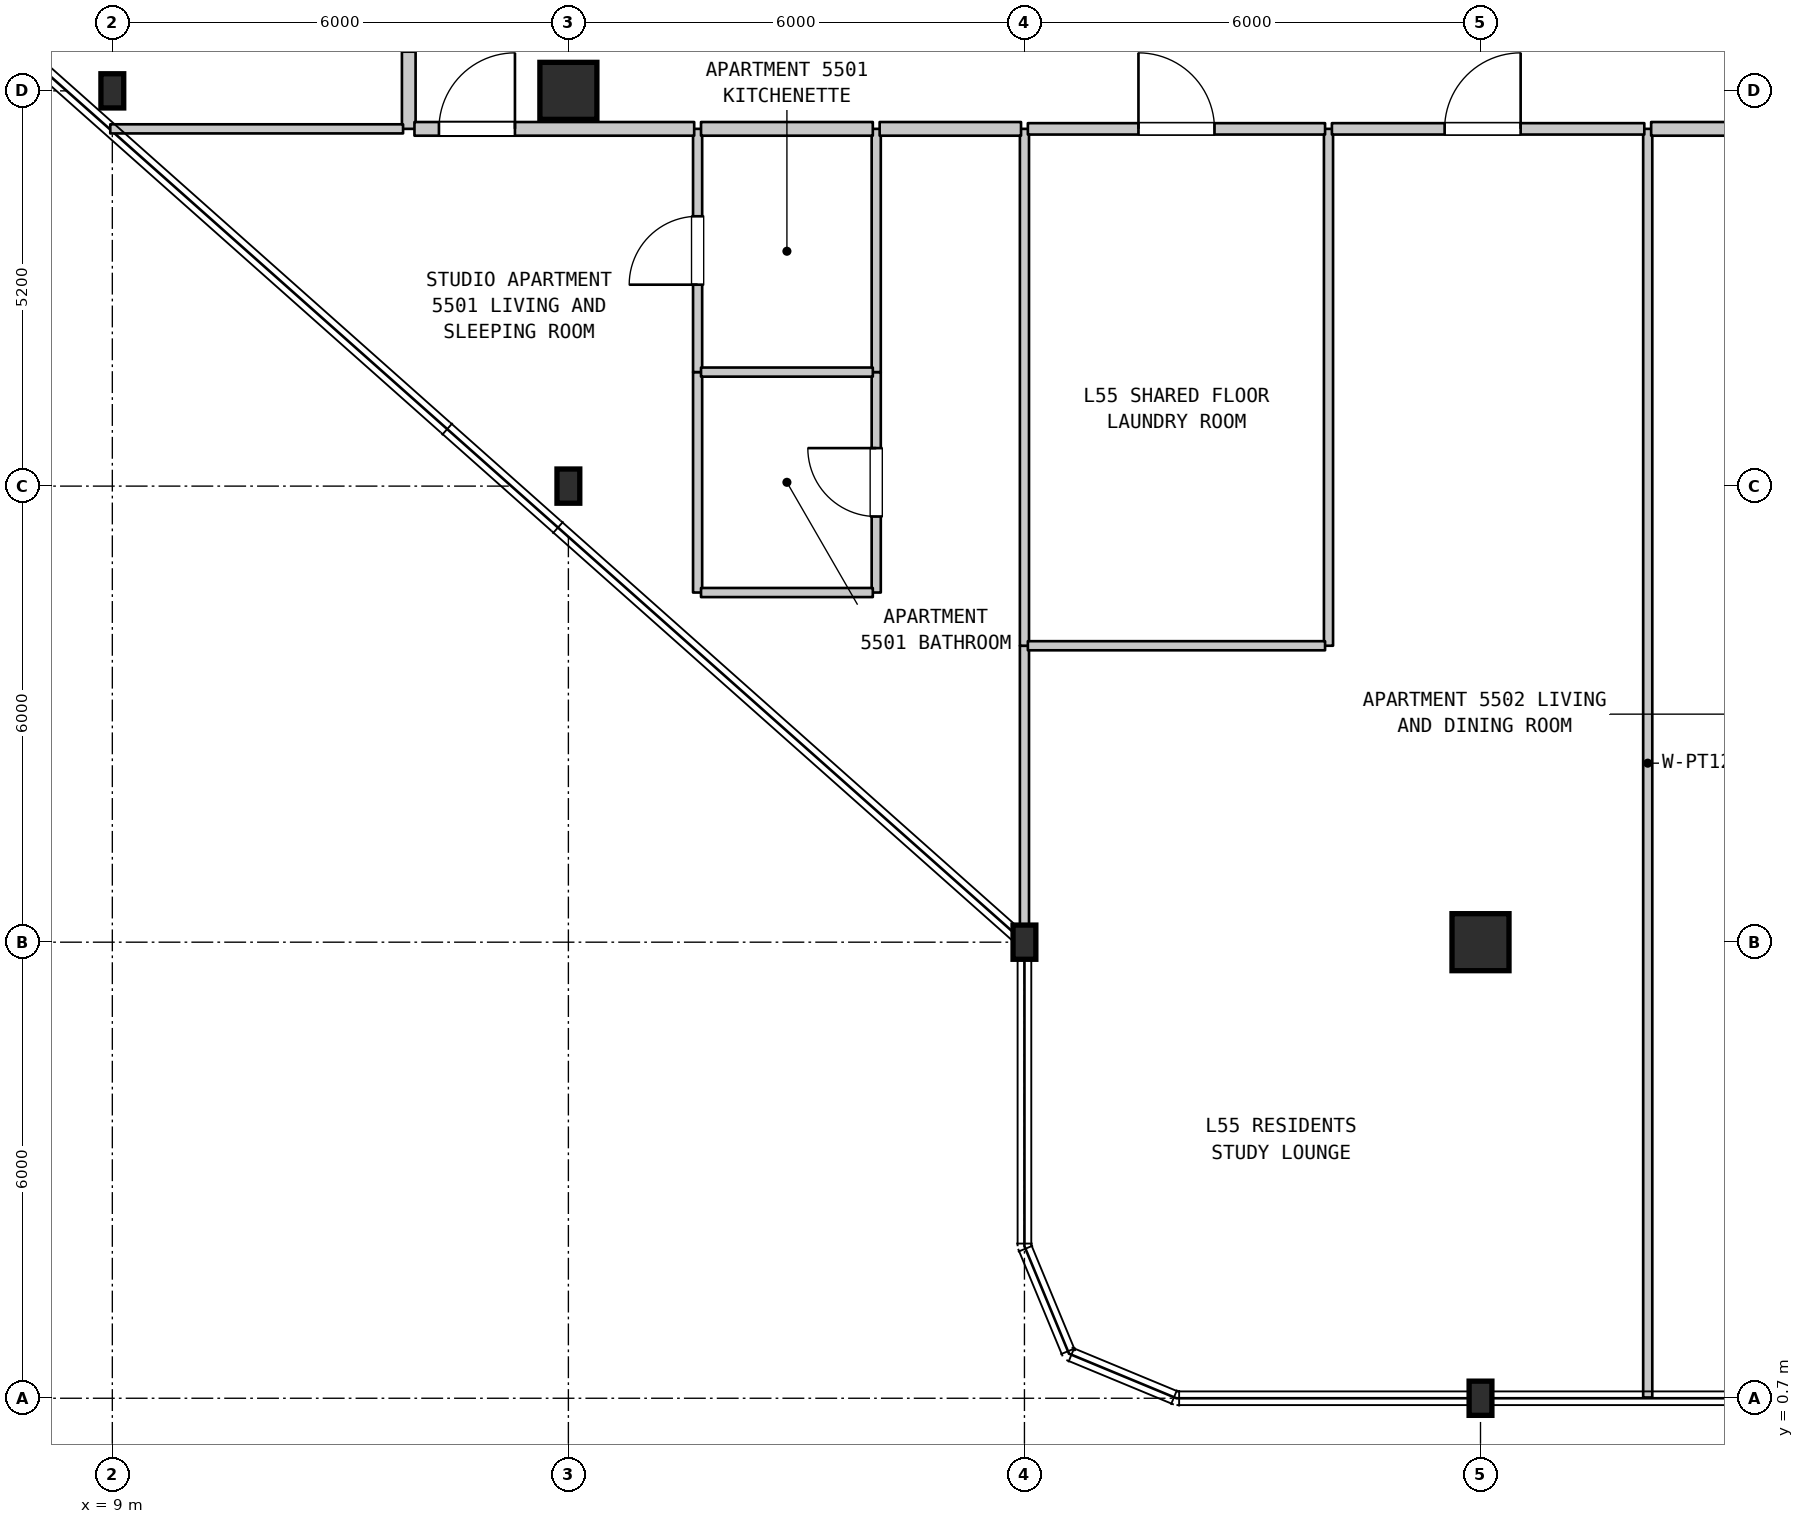
"""IFC4 building model, lengths in metres.
Left out: names, types, materials, properties, quantities, classifications, styles, units other than length and angle.
Written with IfcOpenShell. Run it as: python <this file> out.ifc"""

import sys

from ifc_helpers import new_model, si_unit, direction, frame, frame_2d, origin, origin_2d, place, context, subcontext, project, spatial, rectangle, i_section, extrude, element, fill, save


model = new_model("IFC4")
c1 = context("Model", 3, precision=1e-05, world=origin(), true_north=direction((0.0, 1.0)))
c2 = subcontext(c1, "Body", "Model", "MODEL_VIEW")
j1 = project(units=[si_unit("LENGTHUNIT", "METRE"), si_unit("PLANEANGLEUNIT", "RADIAN")], contexts=[c1])
p1 = place(None, origin())
s1 = spatial("IfcSite", under=j1, at=p1, CompositionType="ELEMENT")
p2 = place(p1, origin())
s2 = spatial("IfcBuilding", under=s1, at=p2, CompositionType="ELEMENT")
p3 = place(p2, frame((0.0, 0.0, 222.8)))
s3 = spatial("IfcBuildingStorey", under=s2, at=p3, CompositionType="ELEMENT", Elevation=222.8)
for number, where, z_axis, x_axis in (
    (1, (9.0, 17.9, 0.0), (0.0, 0.0, 1.0), (1.0, 0.0, 0.0)),
    (2, (15.0, 12.7, 0.0), (0.0, 0.0, 1.0), (1.0, 0.0, 0.0)),
):
    element("IfcColumn", number, at=place(p3, frame(where, z_axis=z_axis, x_axis=x_axis)), inside=s3, PredefinedType="COLUMN", context=c2, shape_type="SweptSolid", body=[
        extrude(i_section(OverallWidth=0.3, OverallDepth=0.45, WebThickness=0.014, FlangeThickness=0.026, FilletRadius=0.027, at=origin_2d()), origin(), (0.0, 0.0, 1.0), 3.7),
    ])
p4 = place(p3, frame((15.0, 17.9, 0.0), z_axis=(0.0, 0.0, 1.0), x_axis=(1.0, 0.0, 0.0)))
e3 = element("IfcColumn", 3, at=p4, inside=s3, PredefinedType="COLUMN", context=c2, shape_type="SweptSolid", body=[
    extrude(rectangle(XDim=0.75, YDim=0.75, at=origin_2d()), origin(), (0.0, 0.0, 1.0), 3.7),
])
for number, where, z_axis, x_axis in (
    (4, (21.0, 6.7, 0.0), (0.0, 0.0, 1.0), (1.0, 0.0, 0.0)),
    (5, (27.0, 0.7, 0.0), (0.0, 0.0, 1.0), (1.0, 0.0, 0.0)),
):
    element("IfcColumn", number, at=place(p3, frame(where, z_axis=z_axis, x_axis=x_axis)), inside=s3, PredefinedType="COLUMN", context=c2, shape_type="SweptSolid", body=[
        extrude(i_section(OverallWidth=0.3, OverallDepth=0.45, WebThickness=0.014, FlangeThickness=0.026, FilletRadius=0.027, at=origin_2d()), origin(), (0.0, 0.0, 1.0), 3.7),
    ])
p5 = place(p3, frame((27.0, 6.7, 0.0), z_axis=(0.0, 0.0, 1.0), x_axis=(1.0, 0.0, 0.0)))
e6 = element("IfcColumn", 6, at=p5, inside=s3, PredefinedType="COLUMN", context=c2, shape_type="SweptSolid", body=[
    extrude(rectangle(XDim=0.75, YDim=0.75, at=origin_2d()), origin(), (0.0, 0.0, 1.0), 3.7),
])
p6 = place(p3, frame((12.9, 17.4, 0.0), z_axis=(0.0, 0.0, 1.0), x_axis=(0.0, 1.0, 0.0)))
e7 = element("IfcWall", 7, at=p6, inside=s3, PredefinedType="STANDARD", context=c2, shape_type="SweptSolid", body=[
    extrude(rectangle(XDim=3.18, YDim=0.18, at=frame_2d((1.59, 0.0))), origin(), (0.0, 0.0, 1.0), 3.39),
])
p7 = place(p6, frame((1.015, 0.0, 0.0)))
e8 = element("IfcOpeningElement", 8, at=p7, cuts=e7, PredefinedType="OPENING", context=c2, shape_type="SweptSolid", body=[
    extrude(rectangle(XDim=1.0, YDim=2.15, at=frame_2d((0.5, 1.075))), frame((0.0, 0.1, 0.0), z_axis=(0.0, -1.0, 0.0), x_axis=(1.0, 0.0, 0.0)), (0.0, 0.0, 1.0), 0.2),
])
p8 = place(p3, frame((16.7, 11.3, 0.0), z_axis=(0.0, 0.0, 1.0), x_axis=(0.0, 1.0, 0.0)))
e9 = element("IfcWall", 9, at=p8, inside=s3, PredefinedType="PARTITIONING", context=c2, shape_type="SweptSolid", body=[
    extrude(rectangle(XDim=2.9, YDim=0.12, at=frame_2d((1.45, 0.0))), origin(), (0.0, 0.0, 1.0), 3.39),
])
p9 = place(p3, frame((16.7, 14.2, 0.0), z_axis=(0.0, 0.0, 1.0), x_axis=(0.0, 1.0, 0.0)))
e10 = element("IfcWall", 10, at=p9, inside=s3, PredefinedType="PARTITIONING", context=c2, shape_type="SweptSolid", body=[
    extrude(rectangle(XDim=3.2, YDim=0.12, at=frame_2d((1.6, 0.0))), origin(), (0.0, 0.0, 1.0), 3.39),
])
p10 = place(p9, frame((1.15, 0.0, 0.0)))
e11 = element("IfcOpeningElement", 11, at=p10, cuts=e10, PredefinedType="OPENING", context=c2, shape_type="SweptSolid", body=[
    extrude(rectangle(XDim=0.9, YDim=2.15, at=frame_2d((0.45, 1.075))), frame((0.0, 0.07, 0.0), z_axis=(0.0, -1.0, 0.0), x_axis=(1.0, 0.0, 0.0)), (0.0, 0.0, 1.0), 0.14),
])
p11 = place(p3, frame((19.05, 11.3, 0.0), z_axis=(0.0, 0.0, 1.0), x_axis=(0.0, 1.0, 0.0)))
e12 = element("IfcWall", 12, at=p11, inside=s3, PredefinedType="PARTITIONING", context=c2, shape_type="SweptSolid", body=[
    extrude(rectangle(XDim=2.9, YDim=0.12, at=frame_2d((1.45, 0.0))), origin(), (0.0, 0.0, 1.0), 3.39),
])
p12 = place(p11, frame((1.0, 0.0, 0.0)))
e13 = element("IfcOpeningElement", 13, at=p12, cuts=e12, PredefinedType="OPENING", context=c2, shape_type="SweptSolid", body=[
    extrude(rectangle(XDim=0.9, YDim=2.1, at=frame_2d((0.45, 1.05))), frame((0.0, 0.07, 0.0), z_axis=(0.0, -1.0, 0.0), x_axis=(1.0, 0.0, 0.0)), (0.0, 0.0, 1.0), 0.14),
])
p13 = place(p3, frame((19.05, 14.2, 0.0), z_axis=(0.0, 0.0, 1.0), x_axis=(0.0, 1.0, 0.0)))
e14 = element("IfcWall", 14, at=p13, inside=s3, PredefinedType="PARTITIONING", context=c2, shape_type="SweptSolid", body=[
    extrude(rectangle(XDim=3.2, YDim=0.12, at=frame_2d((1.6, 0.0))), origin(), (0.0, 0.0, 1.0), 3.39),
])
p14 = place(p3, frame((21.0, 6.71, 0.0), z_axis=(0.0, 0.0, 1.0), x_axis=(0.0, 1.0, 0.0)))
e15 = element("IfcWall", 15, at=p14, inside=s3, PredefinedType="PARTITIONING", context=c2, shape_type="SweptSolid", body=[
    extrude(rectangle(XDim=3.89, YDim=0.12, at=frame_2d((1.945, 0.0))), origin(), (0.0, 0.0, 1.0), 3.39),
])
for number, where, z_axis, x_axis in (
    (16, (21.0, 10.6, 0.0), (0.0, 0.0, 1.0), (0.0, 1.0, 0.0)),
    (17, (25.0, 10.6, 0.0), (0.0, 0.0, 1.0), (0.0, 1.0, 0.0)),
):
    element("IfcWall", number, at=place(p3, frame(where, z_axis=z_axis, x_axis=x_axis)), inside=s3, PredefinedType="PARTITIONING", context=c2, shape_type="SweptSolid", body=[
        extrude(rectangle(XDim=6.8, YDim=0.12, at=frame_2d((3.4, 0.0))), origin(), (0.0, 0.0, 1.0), 3.39),
    ])
p15 = place(p3, frame((29.2, 0.71, 0.0), z_axis=(0.0, 0.0, 1.0), x_axis=(0.0, 1.0, 0.0)))
e18 = element("IfcWall", 18, at=p15, inside=s3, PredefinedType="PARTITIONING", context=c2, shape_type="SweptSolid", body=[
    extrude(rectangle(XDim=16.69, YDim=0.12, at=frame_2d((8.345, 0.0))), origin(), (0.0, 0.0, 1.0), 3.39),
])
p16 = place(p3, frame((21.045, 10.6, 0.0), z_axis=(0.0, 0.0, 1.0), x_axis=(1.0, 0.0, 0.0)))
e19 = element("IfcWall", 19, at=p16, inside=s3, PredefinedType="PARTITIONING", context=c2, shape_type="SweptSolid", body=[
    extrude(rectangle(XDim=3.91, YDim=0.12, at=frame_2d((1.955, 0.0))), origin(), (0.0, 0.0, 1.0), 3.39),
])
for number, where, z_axis, x_axis in (
    (20, (16.745, 11.3, 0.0), (0.0, 0.0, 1.0), (1.0, 0.0, 0.0)),
    (21, (16.745, 14.2, 0.0), (0.0, 0.0, 1.0), (1.0, 0.0, 0.0)),
):
    element("IfcWall", number, at=place(p3, frame(where, z_axis=z_axis, x_axis=x_axis)), inside=s3, PredefinedType="PARTITIONING", context=c2, shape_type="SweptSolid", body=[
        extrude(rectangle(XDim=2.26, YDim=0.12, at=frame_2d((1.13, 0.0))), origin(), (0.0, 0.0, 1.0), 3.39),
    ])
p17 = place(p3, frame((8.973, 17.4, 0.0), z_axis=(0.0, 0.0, 1.0), x_axis=(1.0, 0.0, 0.0)))
e22 = element("IfcWall", 22, at=p17, inside=s3, PredefinedType="PARTITIONING", context=c2, shape_type="SweptSolid", body=[
    extrude(rectangle(XDim=3.852, YDim=0.12, at=frame_2d((1.926, 0.0))), origin(), (0.0, 0.0, 1.0), 3.39),
])
p18 = place(p3, frame((12.975, 17.4, 0.0), z_axis=(0.0, 0.0, 1.0), x_axis=(1.0, 0.0, 0.0)))
e23 = element("IfcWall", 23, at=p18, inside=s3, PredefinedType="STANDARD", context=c2, shape_type="SweptSolid", body=[
    extrude(rectangle(XDim=3.68, YDim=0.18, at=frame_2d((1.84, 0.0))), origin(), (0.0, 0.0, 1.0), 3.39),
])
p19 = place(p18, frame((0.322, 0.0, 0.0)))
e24 = element("IfcOpeningElement", 24, at=p19, cuts=e23, PredefinedType="OPENING", context=c2, shape_type="SweptSolid", body=[
    extrude(rectangle(XDim=1.0, YDim=2.15, at=frame_2d((0.5, 1.075))), frame((0.0, 0.1, 0.0), z_axis=(0.0, -1.0, 0.0), x_axis=(1.0, 0.0, 0.0)), (0.0, 0.0, 1.0), 0.2),
])
p20 = place(p3, frame((16.745, 17.4, 0.0), z_axis=(0.0, 0.0, 1.0), x_axis=(1.0, 0.0, 0.0)))
e25 = element("IfcWall", 25, at=p20, inside=s3, PredefinedType="STANDARD", context=c2, shape_type="SweptSolid", body=[
    extrude(rectangle(XDim=2.26, YDim=0.18, at=frame_2d((1.13, 0.0))), origin(), (0.0, 0.0, 1.0), 3.39),
])
p21 = place(p3, frame((19.095, 17.4, 0.0), z_axis=(0.0, 0.0, 1.0), x_axis=(1.0, 0.0, 0.0)))
e26 = element("IfcWall", 26, at=p21, inside=s3, PredefinedType="STANDARD", context=c2, shape_type="SweptSolid", body=[
    extrude(rectangle(XDim=1.86, YDim=0.18, at=frame_2d((0.93, 0.0))), origin(), (0.0, 0.0, 1.0), 3.39),
])
p22 = place(p3, frame((21.045, 17.4, 0.0), z_axis=(0.0, 0.0, 1.0), x_axis=(1.0, 0.0, 0.0)))
e27 = element("IfcWall", 27, at=p22, inside=s3, PredefinedType="STANDARD", context=c2, shape_type="SweptSolid", body=[
    extrude(rectangle(XDim=3.91, YDim=0.15, at=frame_2d((1.955, 0.0))), origin(), (0.0, 0.0, 1.0), 3.39),
])
p23 = place(p22, frame((1.455, 0.0, 0.0)))
e28 = element("IfcOpeningElement", 28, at=p23, cuts=e27, PredefinedType="OPENING", context=c2, shape_type="SweptSolid", body=[
    extrude(rectangle(XDim=1.0, YDim=2.15, at=frame_2d((0.5, 1.075))), frame((0.0, 0.085, 0.0), z_axis=(0.0, -1.0, 0.0), x_axis=(1.0, 0.0, 0.0)), (0.0, 0.0, 1.0), 0.17),
])
p24 = place(p3, frame((25.045, 17.4, 0.0), z_axis=(0.0, 0.0, 1.0), x_axis=(1.0, 0.0, 0.0)))
e29 = element("IfcWall", 29, at=p24, inside=s3, PredefinedType="STANDARD", context=c2, shape_type="SweptSolid", body=[
    extrude(rectangle(XDim=4.11, YDim=0.15, at=frame_2d((2.055, 0.0))), origin(), (0.0, 0.0, 1.0), 3.39),
])
p25 = place(p24, frame((1.483, 0.0, 0.0)))
e30 = element("IfcOpeningElement", 30, at=p25, cuts=e29, PredefinedType="OPENING", context=c2, shape_type="SweptSolid", body=[
    extrude(rectangle(XDim=1.0, YDim=2.15, at=frame_2d((0.5, 1.075))), frame((0.0, 0.085, 0.0), z_axis=(0.0, -1.0, 0.0), x_axis=(1.0, 0.0, 0.0)), (0.0, 0.0, 1.0), 0.17),
])
p26 = place(p3, frame((29.245, 17.4, 0.0), z_axis=(0.0, 0.0, 1.0), x_axis=(1.0, 0.0, 0.0)))
e31 = element("IfcWall", 31, at=p26, inside=s3, PredefinedType="STANDARD", context=c2, shape_type="SweptSolid", body=[
    extrude(rectangle(XDim=3.51, YDim=0.18, at=frame_2d((1.755, 0.0))), origin(), (0.0, 0.0, 1.0), 3.39),
])
p27 = place(p26, frame((1.255, 0.0, 0.0)))
e32 = element("IfcOpeningElement", 32, at=p27, cuts=e31, PredefinedType="OPENING", context=c2, shape_type="SweptSolid", body=[
    extrude(rectangle(XDim=1.0, YDim=2.15, at=frame_2d((0.5, 1.075))), frame((0.0, 0.1, 0.0), z_axis=(0.0, -1.0, 0.0), x_axis=(1.0, 0.0, 0.0)), (0.0, 0.0, 1.0), 0.2),
])
p28 = place(p10, origin())
e33 = element("IfcDoor", 33, at=p28, inside=s3, OperationType="SINGLE_SWING_LEFT", PredefinedType="DOOR", context=c2, shape_type="SweptSolid", body=[
    extrude(rectangle(XDim=0.9, YDim=2.15, at=frame_2d((0.45, 1.075))), frame((0.0, 0.025, 0.0), z_axis=(0.0, -1.0, 0.0), x_axis=(1.0, 0.0, 0.0)), (0.0, 0.0, 1.0), 0.05),
])
fill(e11, e33)
p29 = place(p12, origin())
e34 = element("IfcDoor", 34, at=p29, inside=s3, OperationType="SINGLE_SWING_RIGHT", PredefinedType="DOOR", context=c2, shape_type="SweptSolid", body=[
    extrude(rectangle(XDim=0.9, YDim=2.1, at=frame_2d((0.45, 1.05))), frame((0.0, 0.025, 0.0), z_axis=(0.0, -1.0, 0.0), x_axis=(1.0, 0.0, 0.0)), (0.0, 0.0, 1.0), 0.05),
])
fill(e13, e34)
p30 = place(p19, origin())
e35 = element("IfcDoor", 35, at=p30, inside=s3, OperationType="SINGLE_SWING_RIGHT", PredefinedType="DOOR", context=c2, shape_type="SweptSolid", body=[
    extrude(rectangle(XDim=1.0, YDim=2.15, at=frame_2d((0.5, 1.075))), frame((0.0, 0.025, 0.0), z_axis=(0.0, -1.0, 0.0), x_axis=(1.0, 0.0, 0.0)), (0.0, 0.0, 1.0), 0.05),
])
fill(e24, e35)
p31 = place(p23, origin())
e36 = element("IfcDoor", 36, at=p31, inside=s3, OperationType="SINGLE_SWING_LEFT", PredefinedType="DOOR", context=c2, shape_type="SweptSolid", body=[
    extrude(rectangle(XDim=1.0, YDim=2.15, at=frame_2d((0.5, 1.075))), frame((0.0, 0.025, 0.0), z_axis=(0.0, -1.0, 0.0), x_axis=(1.0, 0.0, 0.0)), (0.0, 0.0, 1.0), 0.05),
])
fill(e28, e36)
p32 = place(p25, origin())
e37 = element("IfcDoor", 37, at=p32, inside=s3, OperationType="SINGLE_SWING_RIGHT", PredefinedType="DOOR", context=c2, shape_type="SweptSolid", body=[
    extrude(rectangle(XDim=1.0, YDim=2.15, at=frame_2d((0.5, 1.075))), frame((0.0, 0.025, 0.0), z_axis=(0.0, -1.0, 0.0), x_axis=(1.0, 0.0, 0.0)), (0.0, 0.0, 1.0), 0.05),
])
fill(e30, e37)
save(model, sys.argv[1])
